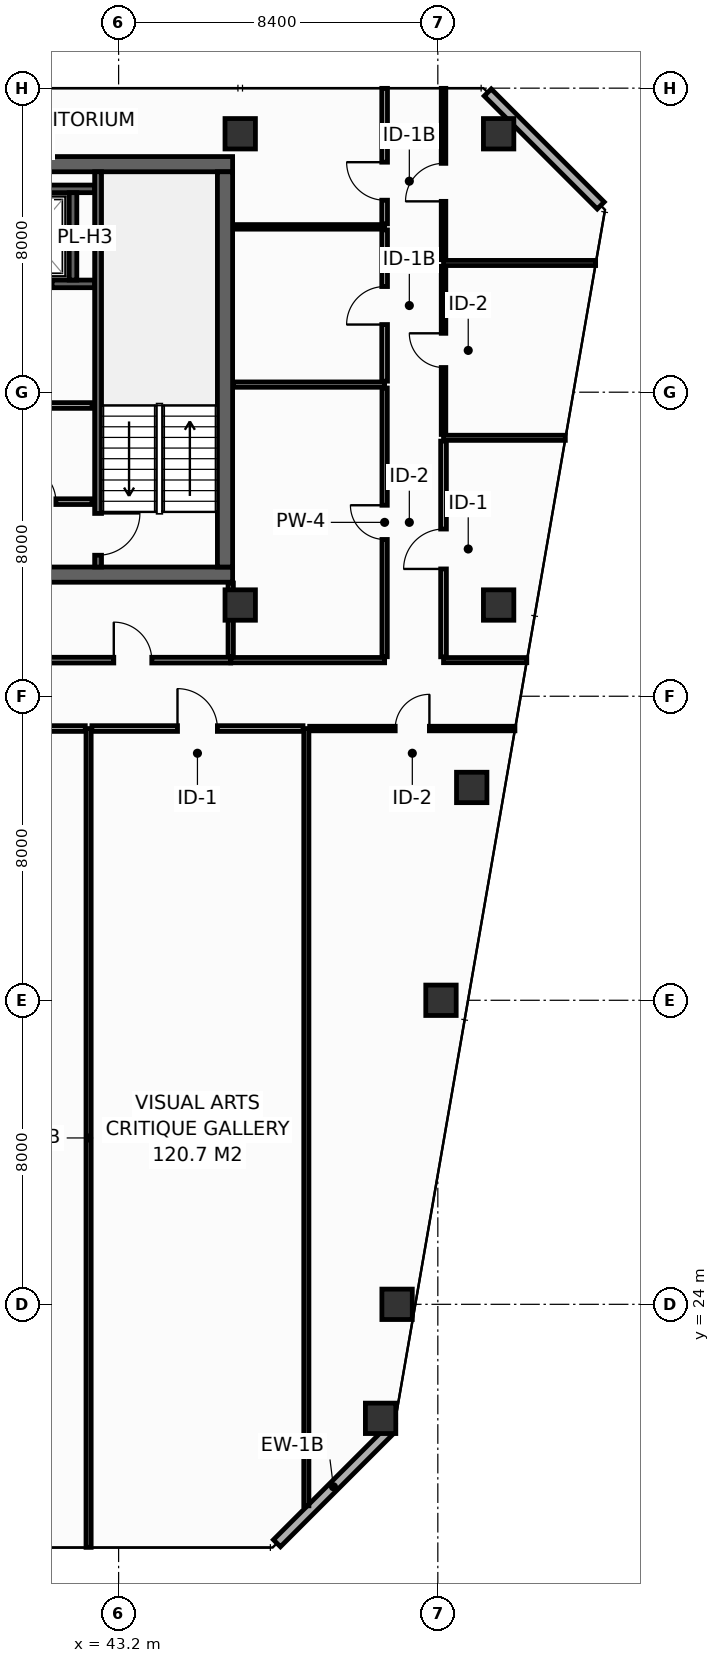
"""IFC4 building model, lengths in metres.
Left out: names, types, materials, properties, quantities, classifications, styles, units other than length and angle.
Written with IfcOpenShell. Run it as: python <this file> out.ifc"""

import sys

from ifc_helpers import new_model, si_unit, direction, frame, frame_2d, origin, origin_2d, place, context, subcontext, project, spatial, rectangle, hollow_rectangle, extrude, element, fill, save


model = new_model("IFC4")
c1 = context("Model", 3, precision=1e-05, world=origin(), true_north=direction((0.0, 1.0)))
c2 = subcontext(c1, "Body", "Model", "MODEL_VIEW")
j1 = project(units=[si_unit("LENGTHUNIT", "METRE"), si_unit("PLANEANGLEUNIT", "RADIAN")], contexts=[c1])
p1 = place(None, origin())
s1 = spatial("IfcSite", under=j1, at=p1, CompositionType="ELEMENT")
p2 = place(p1, origin())
s2 = spatial("IfcBuilding", under=s1, at=p2, CompositionType="ELEMENT")
p3 = place(p2, frame((0.0, 0.0, 238.2)))
s3 = spatial("IfcBuildingStorey", under=s2, at=p3, CompositionType="ELEMENT", Elevation=238.2)
p4 = place(p3, frame((13.7, 43.2, 0.0), z_axis=(0.0, 0.0, 1.0), x_axis=(1.0, 0.0, 0.0)))
e1 = element("IfcWall", 1, at=p4, inside=s3, PredefinedType="SHEAR", context=c2, shape_type="SweptSolid", body=[
    extrude(rectangle(XDim=32.5, YDim=0.4, at=frame_2d((16.25, 0.0))), origin(), (0.0, 0.0, 1.0), 3.55),
])
p5 = place(p4, frame((5.4, 0.0, 0.0)))
e2 = element("IfcOpeningElement", 2, at=p5, cuts=e1, PredefinedType="OPENING", context=c2, shape_type="SweptSolid", body=[
    extrude(rectangle(XDim=1.1, YDim=2.15, at=frame_2d((0.55, 1.075))), frame((0.0, 0.21, 0.0), z_axis=(0.0, -1.0, 0.0), x_axis=(1.0, 0.0, 0.0)), (0.0, 0.0, 1.0), 0.42),
])
p6 = place(p4, frame((25.6, 0.0, 0.0)))
e3 = element("IfcOpeningElement", 3, at=p6, cuts=e1, PredefinedType="OPENING", context=c2, shape_type="SweptSolid", body=[
    extrude(rectangle(XDim=1.1, YDim=2.15, at=frame_2d((0.55, 1.075))), frame((0.0, 0.21, 0.0), z_axis=(0.0, -1.0, 0.0), x_axis=(1.0, 0.0, 0.0)), (0.0, 0.0, 1.0), 0.42),
])
p7 = place(p3, frame((13.7, 54.0, 0.0), z_axis=(0.0, 0.0, 1.0), x_axis=(1.0, 0.0, 0.0)))
e4 = element("IfcWall", 4, at=p7, inside=s3, PredefinedType="SHEAR", context=c2, shape_type="SweptSolid", body=[
    extrude(rectangle(XDim=32.5, YDim=0.4, at=frame_2d((16.25, 0.0))), origin(), (0.0, 0.0, 1.0), 3.55),
])
p8 = place(p3, frame((46.0, 43.4, 0.0), z_axis=(0.0, 0.0, 1.0), x_axis=(0.0, 1.0, 0.0)))
e5 = element("IfcWall", 5, at=p8, inside=s3, PredefinedType="SHEAR", context=c2, shape_type="SweptSolid", body=[
    extrude(rectangle(XDim=10.4, YDim=0.4, at=frame_2d((5.2, 0.0))), origin(), (0.0, 0.0, 1.0), 3.55),
])
for number, where, z_axis, x_axis in (
    (6, (46.4, 54.8, 0.0), (0.0, 0.0, 1.0), (1.0, 0.0, 0.0)),
    (7, (53.2, 54.8, 0.0), (0.0, 0.0, 1.0), (1.0, 0.0, 0.0)),
    (8, (46.4, 42.4, 0.0), (0.0, 0.0, 1.0), (1.0, 0.0, 0.0)),
    (9, (53.2, 42.4, 0.0), (0.0, 0.0, 1.0), (1.0, 0.0, 0.0)),
    (10, (50.094, 21.0, 0.0), (0.0, 0.0, 1.0), (1.0, 0.0, 0.0)),
    (11, (50.528, 24.0, 0.0), (0.0, 0.0, 1.0), (1.0, 0.0, 0.0)),
    (12, (51.683, 32.0, 0.0), (0.0, 0.0, 1.0), (1.0, 0.0, 0.0)),
    (13, (52.492, 37.6, 0.0), (0.0, 0.0, 1.0), (1.0, 0.0, 0.0)),
):
    element("IfcColumn", number, at=place(p3, frame(where, z_axis=z_axis, x_axis=x_axis)), inside=s3, PredefinedType="COLUMN", context=c2, shape_type="SweptSolid", body=[
        extrude(hollow_rectangle(XDim=0.8, YDim=0.8, WallThickness=0.036, at=origin_2d()), origin(), (0.0, 0.0, 1.0), 3.8),
    ])
p9 = place(p3, frame((39.525, 50.85, 0.0), z_axis=(0.0, 0.0, 1.0), x_axis=(1.0, 0.0, 0.0)))
e14 = element("IfcWall", 14, at=p9, inside=s3, PredefinedType="SHEAR", context=c2, shape_type="SweptSolid", body=[
    extrude(rectangle(XDim=3.045, YDim=0.2, at=frame_2d((1.522, 0.0))), origin(), (0.0, 0.0, 1.0), 3.55),
])
p10 = place(p9, frame((0.825, 0.0, 0.0)))
e15 = element("IfcOpeningElement", 15, at=p10, cuts=e14, PredefinedType="OPENING", context=c2, shape_type="SweptSolid", body=[
    extrude(rectangle(XDim=1.1, YDim=2.2, at=frame_2d((0.55, 1.1))), frame((0.0, 0.11, 0.0), z_axis=(0.0, -1.0, 0.0), x_axis=(1.0, 0.0, 0.0)), (0.0, 0.0, 1.0), 0.22),
])
p11 = place(p3, frame((39.525, 53.35, 0.0), z_axis=(0.0, 0.0, 1.0), x_axis=(1.0, 0.0, 0.0)))
e16 = element("IfcWall", 16, at=p11, inside=s3, PredefinedType="SHEAR", context=c2, shape_type="SweptSolid", body=[
    extrude(rectangle(XDim=3.045, YDim=0.2, at=frame_2d((1.522, 0.0))), origin(), (0.0, 0.0, 1.0), 3.55),
])
p12 = place(p3, frame((42.0, 50.95, 0.0), z_axis=(0.0, 0.0, 1.0), x_axis=(0.0, 1.0, 0.0)))
e17 = element("IfcWall", 17, at=p12, inside=s3, PredefinedType="SHEAR", context=c2, shape_type="SweptSolid", body=[
    extrude(rectangle(XDim=2.3, YDim=0.2, at=frame_2d((1.15, 0.0))), origin(), (0.0, 0.0, 1.0), 3.55),
])
p13 = place(p3, frame((42.66, 53.8, 0.0), z_axis=(0.0, 0.0, 1.0), x_axis=(0.0, -1.0, 0.0)))
e18 = element("IfcWall", 18, at=p13, inside=s3, PredefinedType="SHEAR", context=c2, shape_type="SweptSolid", body=[
    extrude(rectangle(XDim=10.4, YDim=0.18, at=frame_2d((5.2, 0.0))), origin(), (0.0, 0.0, 1.0), 3.55),
])
p14 = place(p13, frame((8.99, 0.0, 0.0)))
e19 = element("IfcOpeningElement", 19, at=p14, cuts=e18, PredefinedType="OPENING", context=c2, shape_type="SweptSolid", body=[
    extrude(rectangle(XDim=1.1, YDim=2.15, at=frame_2d((0.55, 1.075))), frame((0.0, 0.1, 0.0), z_axis=(0.0, -1.0, 0.0), x_axis=(1.0, 0.0, 0.0)), (0.0, 0.0, 1.0), 0.2),
])
p15 = place(p3, frame((33.95, 45.12, 0.0), z_axis=(0.0, 0.0, 1.0), x_axis=(1.0, 0.0, 0.0)))
e20 = element("IfcWall", 20, at=p15, inside=s3, PredefinedType="PARTITIONING", context=c2, shape_type="SweptSolid", body=[
    extrude(rectangle(XDim=8.55, YDim=0.15, at=frame_2d((4.275, 0.0))), origin(), (0.0, 0.0, 1.0), 3.55),
])
p16 = place(p15, frame((0.95, 0.0, 0.0)))
e21 = element("IfcOpeningElement", 21, at=p16, cuts=e20, PredefinedType="OPENING", context=c2, shape_type="SweptSolid", body=[
    extrude(rectangle(XDim=0.95, YDim=2.15, at=frame_2d((0.475, 1.075))), frame((0.0, 0.085, 0.0), z_axis=(0.0, -1.0, 0.0), x_axis=(1.0, 0.0, 0.0)), (0.0, 0.0, 1.0), 0.17),
])
p17 = place(p15, frame((3.8, 0.0, 0.0)))
e22 = element("IfcOpeningElement", 22, at=p17, cuts=e20, PredefinedType="OPENING", context=c2, shape_type="SweptSolid", body=[
    extrude(rectangle(XDim=0.95, YDim=2.15, at=frame_2d((0.475, 1.075))), frame((0.0, 0.085, 0.0), z_axis=(0.0, -1.0, 0.0), x_axis=(1.0, 0.0, 0.0)), (0.0, 0.0, 1.0), 0.17),
])
p18 = place(p15, frame((6.65, 0.0, 0.0)))
e23 = element("IfcOpeningElement", 23, at=p18, cuts=e20, PredefinedType="OPENING", context=c2, shape_type="SweptSolid", body=[
    extrude(rectangle(XDim=0.95, YDim=2.15, at=frame_2d((0.475, 1.075))), frame((0.0, 0.085, 0.0), z_axis=(0.0, -1.0, 0.0), x_axis=(1.0, 0.0, 0.0)), (0.0, 0.0, 1.0), 0.17),
])
p19 = place(p3, frame((33.95, 47.65, 0.0), z_axis=(0.0, 0.0, 1.0), x_axis=(1.0, 0.0, 0.0)))
e24 = element("IfcWall", 24, at=p19, inside=s3, PredefinedType="PARTITIONING", context=c2, shape_type="SweptSolid", body=[
    extrude(rectangle(XDim=8.55, YDim=0.15, at=frame_2d((4.275, 0.0))), origin(), (0.0, 0.0, 1.0), 3.55),
])
p20 = place(p3, frame((47.366, 17.713, 0.0), z_axis=(0.0, 0.0, 1.0), x_axis=(0.70707775441, 0.707135806771, 0.0)))
e25 = element("IfcWall", 25, at=p20, inside=s3, PredefinedType="STANDARD", context=c2, shape_type="SweptSolid", body=[
    extrude(rectangle(XDim=4.206, YDim=0.26, at=frame_2d((2.103, 0.0))), origin(), (0.0, 0.0, 1.0), 3.55),
])
p21 = place(p3, frame((55.887, 52.913, 0.0), z_axis=(0.0, 0.0, 1.0), x_axis=(-0.707106781187, 0.707106781187, 0.0)))
e26 = element("IfcWall", 26, at=p21, inside=s3, PredefinedType="STANDARD", context=c2, shape_type="SweptSolid", body=[
    extrude(rectangle(XDim=4.206, YDim=0.26, at=frame_2d((2.103, 0.0))), origin(), (0.0, 0.0, 1.0), 3.55),
])
p22 = place(p3, frame((46.15, 40.95, 0.0), z_axis=(0.0, 0.0, 1.0), x_axis=(1.0, 0.0, 0.0)))
e27 = element("IfcWall", 27, at=p22, inside=s3, PredefinedType="PARTITIONING", context=c2, shape_type="SweptSolid", body=[
    extrude(rectangle(XDim=4.05, YDim=0.14, at=frame_2d((2.025, 0.0))), origin(), (0.0, 0.0, 1.0), 3.55),
])
p23 = place(p3, frame((46.15, 41.04, 0.0), z_axis=(0.0, 0.0, 1.0), x_axis=(0.0, 1.0, 0.0)))
e28 = element("IfcWall", 28, at=p23, inside=s3, PredefinedType="PARTITIONING", context=c2, shape_type="SweptSolid", body=[
    extrude(rectangle(XDim=1.94, YDim=0.14, at=frame_2d((0.97, 0.0))), origin(), (0.0, 0.0, 1.0), 3.55),
])
p24 = place(p3, frame((46.22, 48.2, 0.0), z_axis=(0.0, 0.0, 1.0), x_axis=(1.0, 0.0, 0.0)))
e29 = element("IfcWall", 29, at=p24, inside=s3, PredefinedType="PARTITIONING", context=c2, shape_type="SweptSolid", body=[
    extrude(rectangle(XDim=3.98, YDim=0.14, at=frame_2d((1.99, 0.0))), origin(), (0.0, 0.0, 1.0), 3.55),
])
p25 = place(p3, frame((50.2, 41.04, 0.0), z_axis=(0.0, 0.0, 1.0), x_axis=(0.0, 1.0, 0.0)))
e30 = element("IfcWall", 30, at=p25, inside=s3, PredefinedType="PARTITIONING", context=c2, shape_type="SweptSolid", body=[
    extrude(rectangle(XDim=7.07, YDim=0.14, at=frame_2d((3.535, 0.0))), origin(), (0.0, 0.0, 1.0), 2.947),
])
p26 = place(p25, frame((3.085, 0.0, 0.0)))
e31 = element("IfcOpeningElement", 31, at=p26, cuts=e30, PredefinedType="OPENING", context=c2, shape_type="SweptSolid", body=[
    extrude(rectangle(XDim=0.9, YDim=2.1, at=frame_2d((0.45, 1.05))), frame((0.0, 0.08, 0.0), z_axis=(0.0, -1.0, 0.0), x_axis=(1.0, 0.0, 0.0)), (0.0, 0.0, 1.0), 0.16),
])
p27 = place(p3, frame((46.22, 52.35, 0.0), z_axis=(0.0, 0.0, 1.0), x_axis=(1.0, 0.0, 0.0)))
e32 = element("IfcWall", 32, at=p27, inside=s3, PredefinedType="PARTITIONING", context=c2, shape_type="SweptSolid", body=[
    extrude(rectangle(XDim=3.98, YDim=0.12, at=frame_2d((1.99, 0.0))), origin(), (0.0, 0.0, 1.0), 3.55),
])
p28 = place(p3, frame((50.2, 48.29, 0.0), z_axis=(0.0, 0.0, 1.0), x_axis=(0.0, 1.0, 0.0)))
e33 = element("IfcWall", 33, at=p28, inside=s3, PredefinedType="PARTITIONING", context=c2, shape_type="SweptSolid", body=[
    extrude(rectangle(XDim=3.98, YDim=0.15, at=frame_2d((1.99, 0.0))), origin(), (0.0, 0.0, 1.0), 3.55),
])
p29 = place(p28, frame((1.49, 0.0, 0.0)))
e34 = element("IfcOpeningElement", 34, at=p29, cuts=e33, PredefinedType="OPENING", context=c2, shape_type="SweptSolid", body=[
    extrude(rectangle(XDim=1.0, YDim=2.15, at=frame_2d((0.5, 1.075))), frame((0.0, 0.085, 0.0), z_axis=(0.0, -1.0, 0.0), x_axis=(1.0, 0.0, 0.0)), (0.0, 0.0, 1.0), 0.17),
])
p30 = place(p3, frame((50.2, 52.43, 0.0), z_axis=(0.0, 0.0, 1.0), x_axis=(0.0, 1.0, 0.0)))
e35 = element("IfcWall", 35, at=p30, inside=s3, PredefinedType="PARTITIONING", context=c2, shape_type="SweptSolid", body=[
    extrude(rectangle(XDim=3.565, YDim=0.15, at=frame_2d((1.783, 0.0))), origin(), (0.0, 0.0, 1.0), 2.935),
])
p31 = place(p30, frame((0.622, 0.0, 0.0)))
e36 = element("IfcOpeningElement", 36, at=p31, cuts=e35, PredefinedType="OPENING", context=c2, shape_type="SweptSolid", body=[
    extrude(rectangle(XDim=1.0, YDim=2.15, at=frame_2d((0.5, 1.075))), frame((0.0, 0.085, 0.0), z_axis=(0.0, -1.0, 0.0), x_axis=(1.0, 0.0, 0.0)), (0.0, 0.0, 1.0), 0.17),
])
p32 = place(p3, frame((51.75, 40.95, 0.0), z_axis=(0.0, 0.0, 1.0), x_axis=(1.0, 0.0, 0.0)))
e37 = element("IfcWall", 37, at=p32, inside=s3, PredefinedType="PARTITIONING", context=c2, shape_type="SweptSolid", body=[
    extrude(rectangle(XDim=2.191, YDim=0.135, at=frame_2d((1.095, 0.0))), origin(), (0.0, 0.0, 1.0), 3.085),
])
p33 = place(p3, frame((51.75, 46.8, 0.0), z_axis=(0.0, 0.0, 1.0), x_axis=(1.0, 0.0, 0.0)))
e38 = element("IfcWall", 38, at=p33, inside=s3, PredefinedType="PARTITIONING", context=c2, shape_type="SweptSolid", body=[
    extrude(rectangle(XDim=3.205, YDim=0.135, at=frame_2d((1.603, 0.0))), origin(), (0.0, 0.0, 1.0), 2.947),
])
p34 = place(p3, frame((51.75, 51.4, 0.0), z_axis=(0.0, 0.0, 1.0), x_axis=(1.0, 0.0, 0.0)))
e39 = element("IfcWall", 39, at=p34, inside=s3, PredefinedType="PARTITIONING", context=c2, shape_type="SweptSolid", body=[
    extrude(rectangle(XDim=4.002, YDim=0.135, at=frame_2d((2.001, 0.0))), origin(), (0.0, 0.0, 1.0), 2.947),
])
p35 = place(p3, frame((51.75, 41.038, 0.0), z_axis=(0.0, 0.0, 1.0), x_axis=(0.0, 1.0, 0.0)))
e40 = element("IfcWall", 40, at=p35, inside=s3, PredefinedType="PARTITIONING", context=c2, shape_type="SweptSolid", body=[
    extrude(rectangle(XDim=5.675, YDim=0.15, at=frame_2d((2.837, 0.0))), origin(), (0.0, 0.0, 1.0), 2.947),
])
p36 = place(p35, frame((2.312, 0.0, 0.0)))
e41 = element("IfcOpeningElement", 41, at=p36, cuts=e40, PredefinedType="OPENING", context=c2, shape_type="SweptSolid", body=[
    extrude(rectangle(XDim=1.05, YDim=2.15, at=frame_2d((0.525, 1.075))), frame((0.0, 0.085, 0.0), z_axis=(0.0, -1.0, 0.0), x_axis=(1.0, 0.0, 0.0)), (0.0, 0.0, 1.0), 0.17),
])
p37 = place(p3, frame((51.75, 46.887, 0.0), z_axis=(0.0, 0.0, 1.0), x_axis=(0.0, 1.0, 0.0)))
e42 = element("IfcWall", 42, at=p37, inside=s3, PredefinedType="PARTITIONING", context=c2, shape_type="SweptSolid", body=[
    extrude(rectangle(XDim=4.425, YDim=0.12, at=frame_2d((2.212, 0.0))), origin(), (0.0, 0.0, 1.0), 3.55),
])
p38 = place(p37, frame((1.762, 0.0, 0.0)))
e43 = element("IfcOpeningElement", 43, at=p38, cuts=e42, PredefinedType="OPENING", context=c2, shape_type="SweptSolid", body=[
    extrude(rectangle(XDim=0.9, YDim=2.1, at=frame_2d((0.45, 1.05))), frame((0.0, 0.07, 0.0), z_axis=(0.0, -1.0, 0.0), x_axis=(1.0, 0.0, 0.0)), (0.0, 0.0, 1.0), 0.14),
])
p39 = place(p3, frame((51.75, 51.488, 0.0), z_axis=(0.0, 0.0, 1.0), x_axis=(0.0, 1.0, 0.0)))
e44 = element("IfcWall", 44, at=p39, inside=s3, PredefinedType="PARTITIONING", context=c2, shape_type="SweptSolid", body=[
    extrude(rectangle(XDim=4.508, YDim=0.12, at=frame_2d((2.254, 0.0))), origin(), (0.0, 0.0, 1.0), 2.935),
])
p40 = place(p39, frame((1.534, 0.0, 0.0)))
e45 = element("IfcOpeningElement", 45, at=p40, cuts=e44, PredefinedType="OPENING", context=c2, shape_type="SweptSolid", body=[
    extrude(rectangle(XDim=1.0, YDim=2.15, at=frame_2d((0.5, 1.075))), frame((0.0, 0.07, 0.0), z_axis=(0.0, -1.0, 0.0), x_axis=(1.0, 0.0, 0.0)), (0.0, 0.0, 1.0), 0.14),
])
p41 = place(p3, frame((40.995, 40.95, 0.0), z_axis=(0.0, 0.0, 1.0), x_axis=(1.0, 0.0, 0.0)))
e46 = element("IfcWall", 46, at=p41, inside=s3, PredefinedType="PARTITIONING", context=c2, shape_type="SweptSolid", body=[
    extrude(rectangle(XDim=5.155, YDim=0.15, at=frame_2d((2.577, 0.0))), origin(), (0.0, 0.0, 1.0), 3.55),
])
p42 = place(p41, frame((2.078, 0.0, 0.0)))
e47 = element("IfcOpeningElement", 47, at=p42, cuts=e46, PredefinedType="OPENING", context=c2, shape_type="SweptSolid", body=[
    extrude(rectangle(XDim=1.0, YDim=2.15, at=frame_2d((0.5, 1.075))), frame((0.0, 0.085, 0.0), z_axis=(0.0, -1.0, 0.0), x_axis=(1.0, 0.0, 0.0)), (0.0, 0.0, 1.0), 0.17),
])
p43 = place(p3, frame((42.41, 17.605, 0.0), z_axis=(0.0, 0.0, 1.0), x_axis=(0.0, 1.0, 0.0)))
e48 = element("IfcWall", 48, at=p43, inside=s3, PredefinedType="PARTITIONING", context=c2, shape_type="SweptSolid", body=[
    extrude(rectangle(XDim=21.545, YDim=0.135, at=frame_2d((10.772, 0.0))), origin(), (0.0, 0.0, 1.0), 2.947),
])
p44 = place(p3, frame((48.14, 18.699, 0.0), z_axis=(0.0, 0.0, 1.0), x_axis=(0.0, 1.0, 0.0)))
e49 = element("IfcWall", 49, at=p44, inside=s3, PredefinedType="PARTITIONING", context=c2, shape_type="SweptSolid", body=[
    extrude(rectangle(XDim=20.451, YDim=0.135, at=frame_2d((10.226, 0.0))), origin(), (0.0, 0.0, 1.0), 2.947),
])
p45 = place(p3, frame((36.15, 39.15, 0.0), z_axis=(0.0, 0.0, 1.0), x_axis=(1.0, 0.0, 0.0)))
e50 = element("IfcWall", 50, at=p45, inside=s3, PredefinedType="PARTITIONING", context=c2, shape_type="SweptSolid", body=[
    extrude(rectangle(XDim=6.173, YDim=0.15, at=frame_2d((3.086, 0.0))), origin(), (0.0, 0.0, 1.0), 2.947),
])
p46 = place(p45, frame((2.586, 0.0, 0.0)))
e51 = element("IfcOpeningElement", 51, at=p46, cuts=e50, PredefinedType="OPENING", context=c2, shape_type="SweptSolid", body=[
    extrude(rectangle(XDim=1.0, YDim=2.15, at=frame_2d((0.5, 1.075))), frame((0.0, 0.085, 0.0), z_axis=(0.0, -1.0, 0.0), x_axis=(1.0, 0.0, 0.0)), (0.0, 0.0, 1.0), 0.17),
])
p47 = place(p3, frame((42.498, 39.15, 0.0), z_axis=(0.0, 0.0, 1.0), x_axis=(1.0, 0.0, 0.0)))
e52 = element("IfcWall", 52, at=p47, inside=s3, PredefinedType="PARTITIONING", context=c2, shape_type="SweptSolid", body=[
    extrude(rectangle(XDim=5.555, YDim=0.15, at=frame_2d((2.777, 0.0))), origin(), (0.0, 0.0, 1.0), 3.55),
])
p48 = place(p47, frame((2.252, 0.0, 0.0)))
e53 = element("IfcOpeningElement", 53, at=p48, cuts=e52, PredefinedType="OPENING", context=c2, shape_type="SweptSolid", body=[
    extrude(rectangle(XDim=1.05, YDim=2.15, at=frame_2d((0.525, 1.075))), frame((0.0, 0.085, 0.0), z_axis=(0.0, -1.0, 0.0), x_axis=(1.0, 0.0, 0.0)), (0.0, 0.0, 1.0), 0.17),
])
p49 = place(p3, frame((48.228, 39.15, 0.0), z_axis=(0.0, 0.0, 1.0), x_axis=(1.0, 0.0, 0.0)))
e54 = element("IfcWall", 54, at=p49, inside=s3, PredefinedType="PARTITIONING", context=c2, shape_type="SweptSolid", body=[
    extrude(rectangle(XDim=5.401, YDim=0.12, at=frame_2d((2.701, 0.0))), origin(), (0.0, 0.0, 1.0), 3.085),
])
p50 = place(p49, frame((2.251, 0.0, 0.0)))
e55 = element("IfcOpeningElement", 55, at=p50, cuts=e54, PredefinedType="OPENING", context=c2, shape_type="SweptSolid", body=[
    extrude(rectangle(XDim=0.9, YDim=2.1, at=frame_2d((0.45, 1.05))), frame((0.0, 0.07, 0.0), z_axis=(0.0, -1.0, 0.0), x_axis=(1.0, 0.0, 0.0)), (0.0, 0.0, 1.0), 0.14),
])
p51 = place(p14, origin())
e56 = element("IfcDoor", 56, at=p51, inside=s3, OperationType="SINGLE_SWING_LEFT", PredefinedType="DOOR", context=c2, shape_type="SweptSolid", body=[
    extrude(rectangle(XDim=1.1, YDim=2.15, at=frame_2d((0.55, 1.075))), frame((0.0, 0.025, 0.0), z_axis=(0.0, -1.0, 0.0), x_axis=(1.0, 0.0, 0.0)), (0.0, 0.0, 1.0), 0.05),
])
fill(e19, e56)
p52 = place(p18, origin())
e57 = element("IfcDoor", 57, at=p52, inside=s3, OperationType="SINGLE_SWING_LEFT", PredefinedType="DOOR", context=c2, shape_type="SweptSolid", body=[
    extrude(rectangle(XDim=0.95, YDim=2.15, at=frame_2d((0.475, 1.075))), frame((0.0, 0.025, 0.0), z_axis=(0.0, -1.0, 0.0), x_axis=(1.0, 0.0, 0.0)), (0.0, 0.0, 1.0), 0.05),
])
fill(e23, e57)
p53 = place(p26, origin())
e58 = element("IfcDoor", 58, at=p53, inside=s3, OperationType="SINGLE_SWING_RIGHT", PredefinedType="DOOR", context=c2, shape_type="SweptSolid", body=[
    extrude(rectangle(XDim=0.9, YDim=2.1, at=frame_2d((0.45, 1.05))), frame((0.0, 0.025, 0.0), z_axis=(0.0, -1.0, 0.0), x_axis=(1.0, 0.0, 0.0)), (0.0, 0.0, 1.0), 0.05),
])
fill(e31, e58)
p54 = place(p29, origin())
e59 = element("IfcDoor", 59, at=p54, inside=s3, OperationType="SINGLE_SWING_LEFT", PredefinedType="DOOR", context=c2, shape_type="SweptSolid", body=[
    extrude(rectangle(XDim=1.0, YDim=2.15, at=frame_2d((0.5, 1.075))), frame((0.0, 0.025, 0.0), z_axis=(0.0, -1.0, 0.0), x_axis=(1.0, 0.0, 0.0)), (0.0, 0.0, 1.0), 0.05),
])
fill(e34, e59)
p55 = place(p31, origin())
e60 = element("IfcDoor", 60, at=p55, inside=s3, OperationType="SINGLE_SWING_RIGHT", PredefinedType="DOOR", context=c2, shape_type="SweptSolid", body=[
    extrude(rectangle(XDim=1.0, YDim=2.15, at=frame_2d((0.5, 1.075))), frame((0.0, 0.025, 0.0), z_axis=(0.0, -1.0, 0.0), x_axis=(1.0, 0.0, 0.0)), (0.0, 0.0, 1.0), 0.05),
])
fill(e36, e60)
p56 = place(p36, origin())
e61 = element("IfcDoor", 61, at=p56, inside=s3, OperationType="SINGLE_SWING_LEFT", PredefinedType="DOOR", context=c2, shape_type="SweptSolid", body=[
    extrude(rectangle(XDim=1.05, YDim=2.15, at=frame_2d((0.525, 1.075))), frame((0.0, 0.025, 0.0), z_axis=(0.0, -1.0, 0.0), x_axis=(1.0, 0.0, 0.0)), (0.0, 0.0, 1.0), 0.05),
])
fill(e41, e61)
p57 = place(p38, origin())
e62 = element("IfcDoor", 62, at=p57, inside=s3, OperationType="SINGLE_SWING_RIGHT", PredefinedType="DOOR", context=c2, shape_type="SweptSolid", body=[
    extrude(rectangle(XDim=0.9, YDim=2.1, at=frame_2d((0.45, 1.05))), frame((0.0, 0.025, 0.0), z_axis=(0.0, -1.0, 0.0), x_axis=(1.0, 0.0, 0.0)), (0.0, 0.0, 1.0), 0.05),
])
fill(e43, e62)
p58 = place(p40, origin())
e63 = element("IfcDoor", 63, at=p58, inside=s3, OperationType="SINGLE_SWING_LEFT", PredefinedType="DOOR", context=c2, shape_type="SweptSolid", body=[
    extrude(rectangle(XDim=1.0, YDim=2.15, at=frame_2d((0.5, 1.075))), frame((0.0, 0.025, 0.0), z_axis=(0.0, -1.0, 0.0), x_axis=(1.0, 0.0, 0.0)), (0.0, 0.0, 1.0), 0.05),
])
fill(e45, e63)
p59 = place(p42, origin())
e64 = element("IfcDoor", 64, at=p59, inside=s3, OperationType="SINGLE_SWING_LEFT", PredefinedType="DOOR", context=c2, shape_type="SweptSolid", body=[
    extrude(rectangle(XDim=1.0, YDim=2.15, at=frame_2d((0.5, 1.075))), frame((0.0, 0.025, 0.0), z_axis=(0.0, -1.0, 0.0), x_axis=(1.0, 0.0, 0.0)), (0.0, 0.0, 1.0), 0.05),
])
fill(e47, e64)
p60 = place(p48, origin())
e65 = element("IfcDoor", 65, at=p60, inside=s3, OperationType="SINGLE_SWING_LEFT", PredefinedType="DOOR", context=c2, shape_type="SweptSolid", body=[
    extrude(rectangle(XDim=1.05, YDim=2.15, at=frame_2d((0.525, 1.075))), frame((0.0, 0.025, 0.0), z_axis=(0.0, -1.0, 0.0), x_axis=(1.0, 0.0, 0.0)), (0.0, 0.0, 1.0), 0.05),
])
fill(e53, e65)
p61 = place(p50, origin())
e66 = element("IfcDoor", 66, at=p61, inside=s3, OperationType="SINGLE_SWING_RIGHT", PredefinedType="DOOR", context=c2, shape_type="SweptSolid", body=[
    extrude(rectangle(XDim=0.9, YDim=2.1, at=frame_2d((0.45, 1.05))), frame((0.0, 0.025, 0.0), z_axis=(0.0, -1.0, 0.0), x_axis=(1.0, 0.0, 0.0)), (0.0, 0.0, 1.0), 0.05),
])
fill(e55, e66)
save(model, sys.argv[1])
